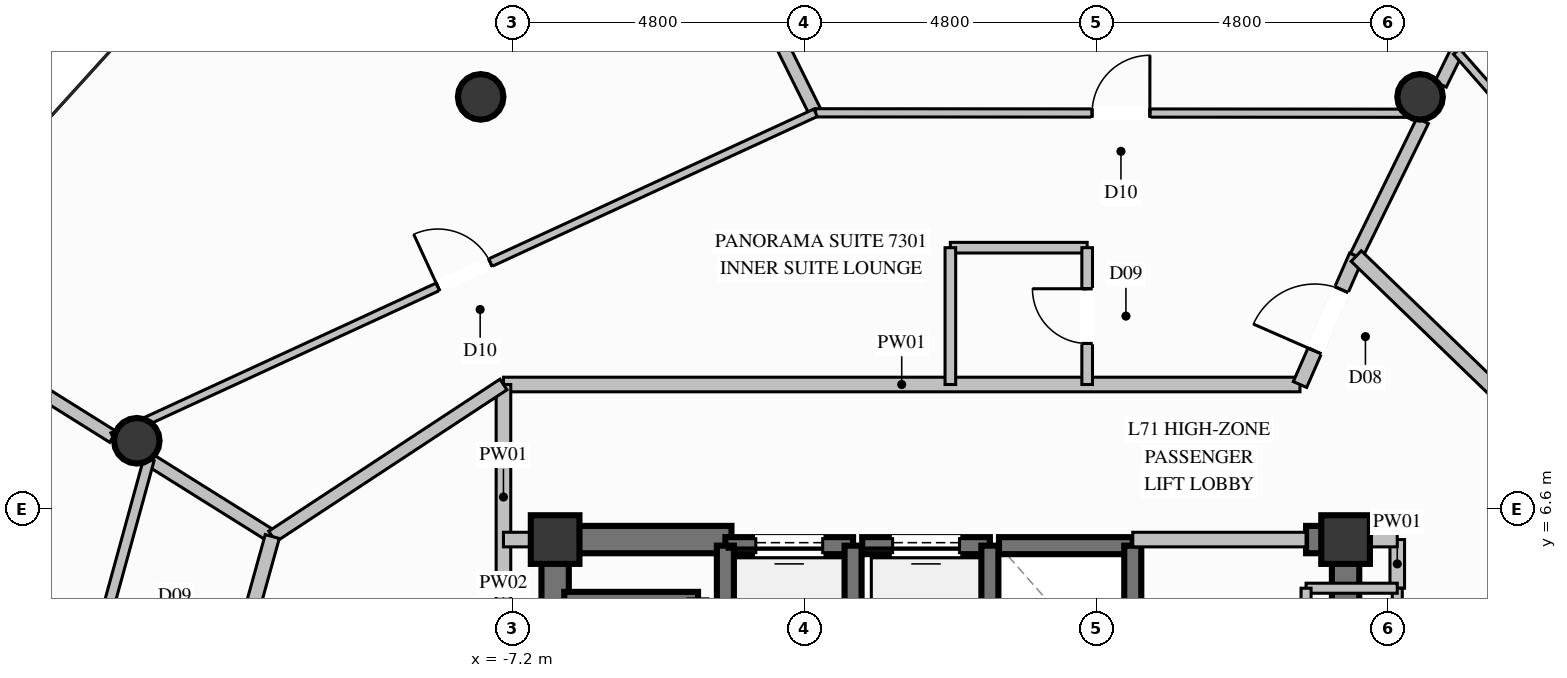
"""IFC4 building model, lengths in metres.
Left out: names, types, materials, properties, quantities, classifications, styles, units other than length and angle.
Written with IfcOpenShell. Run it as: python <this file> out.ifc"""

import sys

from ifc_helpers import new_model, si_unit, direction, frame, frame_2d, origin, origin_2d, place, context, subcontext, project, spatial, rectangle, circle, extrude, element, fill, save


model = new_model("IFC4")
c1 = context("Model", 3, precision=1e-05, world=origin(), true_north=direction((0.0, 1.0)))
c2 = subcontext(c1, "Body", "Model", "MODEL_VIEW")
j1 = project(units=[si_unit("LENGTHUNIT", "METRE"), si_unit("PLANEANGLEUNIT", "RADIAN")], contexts=[c1])
p1 = place(None, origin())
s1 = spatial("IfcSite", under=j1, at=p1, CompositionType="ELEMENT")
p2 = place(p1, origin())
s2 = spatial("IfcBuilding", under=s1, at=p2, CompositionType="ELEMENT")
p3 = place(p2, frame((0.0, 0.0, 274.4)))
s3 = spatial("IfcBuildingStorey", under=s2, at=p3, CompositionType="ELEMENT", Elevation=274.4)
for number, where, z_axis, x_axis in (
    (1, (6.5, 6.1, 0.0), (0.0, 0.0, 1.0), (1.0, 0.0, 0.0)),
    (2, (-6.5, 6.1, 0.0), (0.0, 0.0, 1.0), (1.0, 0.0, 0.0)),
):
    element("IfcColumn", number, at=place(p3, frame(where, z_axis=z_axis, x_axis=x_axis)), inside=s3, PredefinedType="COLUMN", context=c2, shape_type="SweptSolid", body=[
        extrude(rectangle(XDim=0.8, YDim=0.8, at=origin_2d()), origin(), (0.0, 0.0, 1.0), 3.8),
    ])
p4 = place(p3, frame((-6.275, 6.1, 0.0), z_axis=(0.0, 0.0, 1.0), x_axis=(1.0, 0.0, 0.0)))
e3 = element("IfcWall", 3, at=p4, inside=s3, PredefinedType="SHEAR", context=c2, shape_type="SweptSolid", body=[
    extrude(rectangle(XDim=2.675, YDim=0.45, at=frame_2d((1.337, 0.0))), origin(), (0.0, 0.0, 1.0), 3.8),
])
p5 = place(p3, frame((5.85, 6.1, 0.0), z_axis=(0.0, 0.0, 1.0), x_axis=(1.0, 0.0, 0.0)))
e4 = element("IfcWall", 4, at=p5, inside=s3, PredefinedType="SHEAR", context=c2, shape_type="SweptSolid", body=[
    extrude(rectangle(XDim=0.425, YDim=0.45, at=frame_2d((0.212, 0.0))), origin(), (0.0, 0.0, 1.0), 3.8),
])
p6 = place(p3, frame((-6.5, 2.35, 0.0), z_axis=(0.0, 0.0, 1.0), x_axis=(0.0, 1.0, 0.0)))
e5 = element("IfcWall", 5, at=p6, inside=s3, PredefinedType="SHEAR", context=c2, shape_type="SweptSolid", body=[
    extrude(rectangle(XDim=3.975, YDim=0.45, at=frame_2d((1.987, 0.0))), origin(), (0.0, 0.0, 1.0), 3.8),
])
p7 = place(p3, frame((6.5, 3.35, 0.0), z_axis=(0.0, 0.0, 1.0), x_axis=(0.0, 1.0, 0.0)))
e6 = element("IfcWall", 6, at=p7, inside=s3, PredefinedType="SHEAR", context=c2, shape_type="SweptSolid", body=[
    extrude(rectangle(XDim=2.975, YDim=0.45, at=frame_2d((1.487, 0.0))), origin(), (0.0, 0.0, 1.0), 3.8),
])
for number, where, z_axis, x_axis in (
    (7, (7.725, 13.38, 0.0), (0.0, 0.0, 1.0), (1.0, 0.0, 0.0)),
    (8, (-7.725, 13.38, 0.0), (0.0, 0.0, 1.0), (1.0, 0.0, 0.0)),
    (9, (-13.38, 7.725, 0.0), (0.0, 0.0, 1.0), (1.0, 0.0, 0.0)),
):
    element("IfcColumn", number, at=place(p3, frame(where, z_axis=z_axis, x_axis=x_axis)), inside=s3, PredefinedType="COLUMN", context=c2, shape_type="SweptSolid", body=[
        extrude(circle(Radius=0.375, at=origin_2d()), origin(), (0.0, 0.0, 1.0), 3.8),
    ])
p8 = place(p3, frame((-1.6, 6.0, 0.0), z_axis=(0.0, 0.0, 1.0), x_axis=(-1.0, 0.0, 0.0)))
e10 = element("IfcWall", 10, at=p8, inside=s3, PredefinedType="SOLIDWALL", context=c2, shape_type="SweptSolid", body=[
    extrude(rectangle(XDim=2.1, YDim=0.28, at=frame_2d((1.05, 0.0))), origin(), (0.0, 0.0, 1.0), 3.57),
])
p9 = place(p8, frame((0.5, 0.0, 0.0)))
e11 = element("IfcOpeningElement", 11, at=p9, cuts=e10, PredefinedType="OPENING", context=c2, shape_type="SweptSolid", body=[
    extrude(rectangle(XDim=1.1, YDim=2.2, at=frame_2d((0.55, 1.1))), frame((0.0, 0.15, 0.0), z_axis=(0.0, -1.0, 0.0), x_axis=(1.0, 0.0, 0.0)), (0.0, 0.0, 1.0), 0.3),
])
for number, where, z_axis, x_axis in (
    (12, (-3.7, 6.0, 0.0), (0.0, 0.0, 1.0), (0.0, -1.0, 0.0)),
    (13, (-1.6, 3.5, 0.0), (0.0, 0.0, 1.0), (0.0, 1.0, 0.0)),
):
    element("IfcWall", number, at=place(p3, frame(where, z_axis=z_axis, x_axis=x_axis)), inside=s3, PredefinedType="SOLIDWALL", context=c2, shape_type="SweptSolid", body=[
        extrude(rectangle(XDim=2.5, YDim=0.28, at=frame_2d((1.25, 0.0))), origin(), (0.0, 0.0, 1.0), 3.57),
    ])
p10 = place(p3, frame((0.65, 6.0, 0.0), z_axis=(0.0, 0.0, 1.0), x_axis=(-1.0, 0.0, 0.0)))
e14 = element("IfcWall", 14, at=p10, inside=s3, PredefinedType="SOLIDWALL", context=c2, shape_type="SweptSolid", body=[
    extrude(rectangle(XDim=2.1, YDim=0.28, at=frame_2d((1.05, 0.0))), origin(), (0.0, 0.0, 1.0), 3.57),
])
p11 = place(p10, frame((0.5, 0.0, 0.0)))
e15 = element("IfcOpeningElement", 15, at=p11, cuts=e14, PredefinedType="OPENING", context=c2, shape_type="SweptSolid", body=[
    extrude(rectangle(XDim=1.1, YDim=2.2, at=frame_2d((0.55, 1.1))), frame((0.0, 0.15, 0.0), z_axis=(0.0, -1.0, 0.0), x_axis=(1.0, 0.0, 0.0)), (0.0, 0.0, 1.0), 0.3),
])
p12 = place(p3, frame((0.65, 3.5, 0.0), z_axis=(0.0, 0.0, 1.0), x_axis=(0.0, 1.0, 0.0)))
e16 = element("IfcWall", 16, at=p12, inside=s3, PredefinedType="SOLIDWALL", context=c2, shape_type="SweptSolid", body=[
    extrude(rectangle(XDim=2.5, YDim=0.28, at=frame_2d((1.25, 0.0))), origin(), (0.0, 0.0, 1.0), 3.57),
])
p13 = place(p3, frame((3.0, 6.0, 0.0), z_axis=(0.0, 0.0, 1.0), x_axis=(-1.0, 0.0, 0.0)))
e17 = element("IfcWall", 17, at=p13, inside=s3, PredefinedType="SOLIDWALL", context=c2, shape_type="SweptSolid", body=[
    extrude(rectangle(XDim=2.2, YDim=0.28, at=frame_2d((1.1, 0.0))), origin(), (0.0, 0.0, 1.0), 3.57),
])
p14 = place(p3, frame((3.0, 3.5, 0.0), z_axis=(0.0, 0.0, 1.0), x_axis=(0.0, 1.0, 0.0)))
e18 = element("IfcWall", 18, at=p14, inside=s3, PredefinedType="SOLIDWALL", context=c2, shape_type="SweptSolid", body=[
    extrude(rectangle(XDim=2.5, YDim=0.28, at=frame_2d((1.25, 0.0))), origin(), (0.0, 0.0, 1.0), 3.57),
])
p15 = place(p3, frame((-4.15, 5.1, 0.0), z_axis=(0.0, 0.0, 1.0), x_axis=(-1.0, 0.0, 0.0)))
e19 = element("IfcWall", 19, at=p15, inside=s3, PredefinedType="SOLIDWALL", context=c2, shape_type="SweptSolid", body=[
    extrude(rectangle(XDim=2.2, YDim=0.28, at=frame_2d((1.1, 0.0))), origin(), (0.0, 0.0, 1.0), 3.57),
])
p16 = place(p3, frame((-7.35, 8.65, 0.0), z_axis=(0.0, 0.0, 1.0), x_axis=(1.0, 0.0, 0.0)))
e20 = element("IfcWall", 20, at=p16, inside=s3, PredefinedType="PARTITIONING", context=c2, shape_type="SweptSolid", body=[
    extrude(rectangle(XDim=13.1, YDim=0.24, at=frame_2d((6.55, 0.0))), origin(), (0.0, 0.0, 1.0), 3.57),
])
p17 = place(p3, frame((3.0, 6.1, 0.0), z_axis=(0.0, 0.0, 1.0), x_axis=(1.0, 0.0, 0.0)))
e21 = element("IfcWall", 21, at=p17, inside=s3, PredefinedType="PARTITIONING", context=c2, shape_type="SweptSolid", body=[
    extrude(rectangle(XDim=2.85, YDim=0.24, at=frame_2d((1.425, 0.0))), origin(), (0.0, 0.0, 1.0), 2.655),
])
p18 = place(p3, frame((7.35, 5.3, 0.0), z_axis=(0.0, 0.0, 1.0), x_axis=(0.0, 1.0, 0.0)))
e22 = element("IfcWall", 22, at=p18, inside=s3, PredefinedType="PARTITIONING", context=c2, shape_type="SweptSolid", body=[
    extrude(rectangle(XDim=0.8, YDim=0.24, at=frame_2d((0.4, 0.0))), origin(), (0.0, 0.0, 1.0), 2.655),
])
p19 = place(p3, frame((6.5, 6.1, 0.0), z_axis=(0.0, 0.0, 1.0), x_axis=(1.0, 0.0, 0.0)))
e23 = element("IfcWall", 23, at=p19, inside=s3, PredefinedType="PARTITIONING", context=c2, shape_type="SweptSolid", body=[
    extrude(rectangle(XDim=0.85, YDim=0.24, at=frame_2d((0.425, 0.0))), origin(), (0.0, 0.0, 1.0), 3.086),
])
p20 = place(p3, frame((-7.35, 4.95, 0.0), z_axis=(0.0, 0.0, 1.0), x_axis=(0.0, 1.0, 0.0)))
e24 = element("IfcWall", 24, at=p20, inside=s3, PredefinedType="PARTITIONING", context=c2, shape_type="SweptSolid", body=[
    extrude(rectangle(XDim=3.7, YDim=0.24, at=frame_2d((1.85, 0.0))), origin(), (0.0, 0.0, 1.0), 2.655),
])
p21 = place(p3, frame((-7.35, 6.1, 0.0), z_axis=(0.0, 0.0, 1.0), x_axis=(1.0, 0.0, 0.0)))
e25 = element("IfcWall", 25, at=p21, inside=s3, PredefinedType="PARTITIONING", context=c2, shape_type="SweptSolid", body=[
    extrude(rectangle(XDim=0.85, YDim=0.24, at=frame_2d((0.425, 0.0))), origin(), (0.0, 0.0, 1.0), 3.086),
])
p22 = place(p3, frame((7.35, 2.75, 0.0), z_axis=(0.0, 0.0, 1.0), x_axis=(0.0, 1.0, 0.0)))
e26 = element("IfcWall", 26, at=p22, inside=s3, PredefinedType="PARTITIONING", context=c2, shape_type="SweptSolid", body=[
    extrude(rectangle(XDim=2.55, YDim=0.165, at=frame_2d((1.275, 0.0))), origin(), (0.0, 0.0, 1.0), 3.57),
])
p23 = place(p22, frame((0.75, 0.0, 0.0)))
e27 = element("IfcOpeningElement", 27, at=p23, cuts=e26, PredefinedType="OPENING", context=c2, shape_type="SweptSolid", body=[
    extrude(rectangle(XDim=1.05, YDim=2.15, at=frame_2d((0.525, 1.075))), frame((0.0, 0.093, 0.0), z_axis=(0.0, -1.0, 0.0), x_axis=(1.0, 0.0, 0.0)), (0.0, 0.0, 1.0), 0.185),
])
p24 = place(p3, frame((7.35, 5.3, 0.0), z_axis=(0.0, 0.0, 1.0), x_axis=(-1.0, 0.0, 0.0)))
e28 = element("IfcWall", 28, at=p24, inside=s3, PredefinedType="PARTITIONING", context=c2, shape_type="SweptSolid", body=[
    extrude(rectangle(XDim=1.5, YDim=0.165, at=frame_2d((0.75, 0.0))), origin(), (0.0, 0.0, 1.0), 2.655),
])
p25 = place(p3, frame((5.85, 5.3, 0.0), z_axis=(0.0, 0.0, 1.0), x_axis=(0.0, -1.0, 0.0)))
e29 = element("IfcWall", 29, at=p25, inside=s3, PredefinedType="PARTITIONING", context=c2, shape_type="SweptSolid", body=[
    extrude(rectangle(XDim=2.55, YDim=0.165, at=frame_2d((1.275, 0.0))), origin(), (0.0, 0.0, 1.0), 2.655),
])
p26 = place(p3, frame((6.675, 10.762, 0.0), z_axis=(0.0, 0.0, 1.0), x_axis=(0.440582273055, 0.897712237117, 0.0)))
e30 = element("IfcWall", 30, at=p26, inside=s3, PredefinedType="PARTITIONING", context=c2, shape_type="SweptSolid", body=[
    extrude(rectangle(XDim=2.479, YDim=0.21, at=frame_2d((1.239, 0.0))), origin(), (0.0, 0.0, 1.0), 3.086),
])
p27 = place(p3, frame((8.062, 13.587, 0.0), z_axis=(0.0, 0.0, 1.0), x_axis=(0.440576121929, 0.897715255961, 0.0)))
e31 = element("IfcWall", 31, at=p27, inside=s3, PredefinedType="PARTITIONING", context=c2, shape_type="SweptSolid", body=[
    extrude(rectangle(XDim=2.801, YDim=0.21, at=frame_2d((1.4, 0.0))), origin(), (0.0, 0.0, 1.0), 3.57),
])
p28 = place(p3, frame((-11.152, 6.15, 0.0), z_axis=(0.0, 0.0, 1.0), x_axis=(-0.847696016943, 0.530482292692, 0.0)))
e32 = element("IfcWall", 32, at=p28, inside=s3, PredefinedType="PARTITIONING", context=c2, shape_type="SweptSolid", body=[
    extrude(rectangle(XDim=2.361, YDim=0.21, at=frame_2d((1.18, 0.0))), origin(), (0.0, 0.0, 1.0), 3.086),
])
p29 = place(p3, frame((-13.77, 7.788, 0.0), z_axis=(0.0, 0.0, 1.0), x_axis=(-0.84770992622, 0.530460065404, 0.0)))
e33 = element("IfcWall", 33, at=p29, inside=s3, PredefinedType="PARTITIONING", context=c2, shape_type="SweptSolid", body=[
    extrude(rectangle(XDim=3.949, YDim=0.21, at=frame_2d((1.975, 0.0))), origin(), (0.0, 0.0, 1.0), 3.57),
])
p30 = place(p3, frame((0.0, 10.9, 0.0), z_axis=(0.0, 0.0, 1.0), x_axis=(1.0, 0.0, 0.0)))
e34 = element("IfcWall", 34, at=p30, inside=s3, PredefinedType="PLUMBINGWALL", context=c2, shape_type="SweptSolid", body=[
    extrude(rectangle(XDim=2.25, YDim=0.175, at=frame_2d((1.125, 0.0))), origin(), (0.0, 0.0, 1.0), 3.253),
])
p31 = place(p3, frame((0.0, 10.9, 0.0), z_axis=(0.0, 0.0, 1.0), x_axis=(0.0, -1.0, 0.0)))
e35 = element("IfcWall", 35, at=p31, inside=s3, PredefinedType="PLUMBINGWALL", context=c2, shape_type="SweptSolid", body=[
    extrude(rectangle(XDim=2.25, YDim=0.175, at=frame_2d((1.125, 0.0))), origin(), (0.0, 0.0, 1.0), 3.57),
])
p32 = place(p3, frame((2.25, 8.65, 0.0), z_axis=(0.0, 0.0, 1.0), x_axis=(0.0, 1.0, 0.0)))
e36 = element("IfcWall", 36, at=p32, inside=s3, PredefinedType="PLUMBINGWALL", context=c2, shape_type="SweptSolid", body=[
    extrude(rectangle(XDim=2.25, YDim=0.175, at=frame_2d((1.125, 0.0))), origin(), (0.0, 0.0, 1.0), 3.57),
])
p33 = place(p32, frame((0.675, 0.0, 0.0)))
e37 = element("IfcOpeningElement", 37, at=p33, cuts=e36, PredefinedType="OPENING", context=c2, shape_type="SweptSolid", body=[
    extrude(rectangle(XDim=0.9, YDim=2.1, at=frame_2d((0.45, 1.05))), frame((0.0, 0.098, 0.0), z_axis=(0.0, -1.0, 0.0), x_axis=(1.0, 0.0, 0.0)), (0.0, 0.0, 1.0), 0.195),
])
p34 = place(p3, frame((-11.152, 6.15, 0.0), z_axis=(0.0, 0.0, 1.0), x_axis=(0.835549960432, 0.549414473437, 0.0)))
e38 = element("IfcWall", 38, at=p34, inside=s3, PredefinedType="PARTITIONING", context=c2, shape_type="SweptSolid", body=[
    extrude(rectangle(XDim=4.55, YDim=0.21, at=frame_2d((2.275, 0.0))), origin(), (0.0, 0.0, 1.0), 3.57),
])
p35 = place(p3, frame((5.75, 8.65, 0.0), z_axis=(0.0, 0.0, 1.0), x_axis=(0.401190953907, 0.915994442398, 0.0)))
e39 = element("IfcWall", 39, at=p35, inside=s3, PredefinedType="PARTITIONING", context=c2, shape_type="SweptSolid", body=[
    extrude(rectangle(XDim=2.306, YDim=0.24, at=frame_2d((1.153, 0.0))), origin(), (0.0, 0.0, 1.0), 3.086),
])
p36 = place(p35, frame((0.603, 0.0, 0.0)))
e40 = element("IfcOpeningElement", 40, at=p36, cuts=e39, PredefinedType="OPENING", context=c2, shape_type="SweptSolid", body=[
    extrude(rectangle(XDim=1.1, YDim=2.3, at=frame_2d((0.55, 1.15))), frame((0.0, 0.13, 0.0), z_axis=(0.0, -1.0, 0.0), x_axis=(1.0, 0.0, 0.0)), (0.0, 0.0, 1.0), 0.26),
])
p37 = place(p3, frame((-2.217, 13.118, 0.0), z_axis=(0.0, 0.0, 1.0), x_axis=(-0.444565552275, 0.895746319965, 0.0)))
e41 = element("IfcWall", 41, at=p37, inside=s3, PredefinedType="PARTITIONING", context=c2, shape_type="SweptSolid", body=[
    extrude(rectangle(XDim=6.348, YDim=0.21, at=frame_2d((3.174, 0.0))), origin(), (0.0, 0.0, 1.0), 3.57),
])
p38 = place(p3, frame((-2.217, 13.118, 0.0), z_axis=(0.0, 0.0, 1.0), x_axis=(0.999999768435, -0.000680536494, 0.0)))
e42 = element("IfcWall", 42, at=p38, inside=s3, PredefinedType="PARTITIONING", context=c2, shape_type="SweptSolid", body=[
    extrude(rectangle(XDim=10.045, YDim=0.135, at=frame_2d((5.022, 0.0))), origin(), (0.0, 0.0, 1.0), 3.138),
])
p39 = place(p38, frame((4.548, 0.0, 0.0)))
e43 = element("IfcOpeningElement", 43, at=p39, cuts=e42, PredefinedType="OPENING", context=c2, shape_type="SweptSolid", body=[
    extrude(rectangle(XDim=0.95, YDim=2.1, at=frame_2d((0.475, 1.05))), frame((0.0, 0.078, 0.0), z_axis=(0.0, -1.0, 0.0), x_axis=(1.0, 0.0, 0.0)), (0.0, 0.0, 1.0), 0.155),
])
p40 = place(p3, frame((-13.777, 7.793, 0.0), z_axis=(0.0, 0.0, 1.0), x_axis=(0.908271846509, 0.418380512021, 0.0)))
e44 = element("IfcWall", 44, at=p40, inside=s3, PredefinedType="PARTITIONING", context=c2, shape_type="SweptSolid", body=[
    extrude(rectangle(XDim=12.728, YDim=0.135, at=frame_2d((6.364, 0.0))), origin(), (0.0, 0.0, 1.0), 3.138),
])
p41 = place(p40, frame((5.889, 0.0, 0.0)))
e45 = element("IfcOpeningElement", 45, at=p41, cuts=e44, PredefinedType="OPENING", context=c2, shape_type="SweptSolid", body=[
    extrude(rectangle(XDim=0.95, YDim=2.1, at=frame_2d((0.475, 1.05))), frame((0.0, 0.078, 0.0), z_axis=(0.0, -1.0, 0.0), x_axis=(1.0, 0.0, 0.0)), (0.0, 0.0, 1.0), 0.155),
])
p42 = place(p3, frame((-11.152, 6.15, 0.0), z_axis=(0.0, 0.0, 1.0), x_axis=(-0.267267816759, -0.963622288101, 0.0)))
e46 = element("IfcWall", 46, at=p42, inside=s3, PredefinedType="PARTITIONING", context=c2, shape_type="SweptSolid", body=[
    extrude(rectangle(XDim=2.746, YDim=0.24, at=frame_2d((1.373, 0.0))), origin(), (0.0, 0.0, 1.0), 3.57),
])
p43 = place(p3, frame((-13.18, 7.419, 0.0), z_axis=(0.0, 0.0, 1.0), x_axis=(-0.264530676723, -0.96437727113, 0.0)))
e47 = element("IfcWall", 47, at=p43, inside=s3, PredefinedType="PLUMBINGWALL", context=c2, shape_type="SweptSolid", body=[
    extrude(rectangle(XDim=3.274, YDim=0.175, at=frame_2d((1.637, 0.0))), origin(), (0.0, 0.0, 1.0), 3.138),
])
p44 = place(p3, frame((11.452, 6.15, 0.0), z_axis=(0.0, 0.0, 1.0), x_axis=(-0.719407162497, 0.694588608133, 0.0)))
e48 = element("IfcWall", 48, at=p44, inside=s3, PredefinedType="PARTITIONING", context=c2, shape_type="SweptSolid", body=[
    extrude(rectangle(XDim=6.64, YDim=0.24, at=frame_2d((3.32, 0.0))), origin(), (0.0, 0.0, 1.0), 3.57),
])
p45 = place(p3, frame((13.851, 7.826, 0.0), z_axis=(0.0, 0.0, 1.0), x_axis=(-0.659356064883, 0.751830818537, 0.0)))
e49 = element("IfcWall", 49, at=p45, inside=s3, PredefinedType="PARTITIONING", context=c2, shape_type="SweptSolid", body=[
    extrude(rectangle(XDim=8.38, YDim=0.135, at=frame_2d((4.19, 0.0))), origin(), (0.0, 0.0, 1.0), 3.005),
])
p46 = place(p45, frame((3.715, 0.0, 0.0)))
e50 = element("IfcOpeningElement", 50, at=p46, cuts=e49, PredefinedType="OPENING", context=c2, shape_type="SweptSolid", body=[
    extrude(rectangle(XDim=0.95, YDim=2.1, at=frame_2d((0.475, 1.05))), frame((0.0, 0.078, 0.0), z_axis=(0.0, -1.0, 0.0), x_axis=(1.0, 0.0, 0.0)), (0.0, 0.0, 1.0), 0.155),
])
p47 = place(p9, origin())
e51 = element("IfcDoor", 51, at=p47, inside=s3, OperationType="SLIDING_TO_LEFT", PredefinedType="DOOR", context=c2, shape_type="SweptSolid", body=[
    extrude(rectangle(XDim=1.1, YDim=2.2, at=frame_2d((0.55, 1.1))), frame((0.0, 0.025, 0.0), z_axis=(0.0, -1.0, 0.0), x_axis=(1.0, 0.0, 0.0)), (0.0, 0.0, 1.0), 0.05),
])
fill(e11, e51)
p48 = place(p11, origin())
e52 = element("IfcDoor", 52, at=p48, inside=s3, OperationType="SLIDING_TO_LEFT", PredefinedType="DOOR", context=c2, shape_type="SweptSolid", body=[
    extrude(rectangle(XDim=1.1, YDim=2.2, at=frame_2d((0.55, 1.1))), frame((0.0, 0.025, 0.0), z_axis=(0.0, -1.0, 0.0), x_axis=(1.0, 0.0, 0.0)), (0.0, 0.0, 1.0), 0.05),
])
fill(e15, e52)
p49 = place(p33, origin())
e53 = element("IfcDoor", 53, at=p49, inside=s3, OperationType="SINGLE_SWING_RIGHT", PredefinedType="DOOR", context=c2, shape_type="SweptSolid", body=[
    extrude(rectangle(XDim=0.9, YDim=2.1, at=frame_2d((0.45, 1.05))), frame((0.0, 0.025, 0.0), z_axis=(0.0, -1.0, 0.0), x_axis=(1.0, 0.0, 0.0)), (0.0, 0.0, 1.0), 0.05),
])
fill(e37, e53)
p50 = place(p36, origin())
e54 = element("IfcDoor", 54, at=p50, inside=s3, OperationType="SINGLE_SWING_LEFT", PredefinedType="DOOR", context=c2, shape_type="SweptSolid", body=[
    extrude(rectangle(XDim=1.1, YDim=2.3, at=frame_2d((0.55, 1.15))), frame((0.0, 0.025, 0.0), z_axis=(0.0, -1.0, 0.0), x_axis=(1.0, 0.0, 0.0)), (0.0, 0.0, 1.0), 0.05),
])
fill(e40, e54)
p51 = place(p39, origin())
e55 = element("IfcDoor", 55, at=p51, inside=s3, OperationType="SINGLE_SWING_RIGHT", PredefinedType="DOOR", context=c2, shape_type="SweptSolid", body=[
    extrude(rectangle(XDim=0.95, YDim=2.1, at=frame_2d((0.475, 1.05))), frame((0.0, 0.025, 0.0), z_axis=(0.0, -1.0, 0.0), x_axis=(1.0, 0.0, 0.0)), (0.0, 0.0, 1.0), 0.05),
])
fill(e43, e55)
p52 = place(p41, origin())
e56 = element("IfcDoor", 56, at=p52, inside=s3, OperationType="SINGLE_SWING_LEFT", PredefinedType="DOOR", context=c2, shape_type="SweptSolid", body=[
    extrude(rectangle(XDim=0.95, YDim=2.1, at=frame_2d((0.475, 1.05))), frame((0.0, 0.025, 0.0), z_axis=(0.0, -1.0, 0.0), x_axis=(1.0, 0.0, 0.0)), (0.0, 0.0, 1.0), 0.05),
])
fill(e45, e56)
save(model, sys.argv[1])
